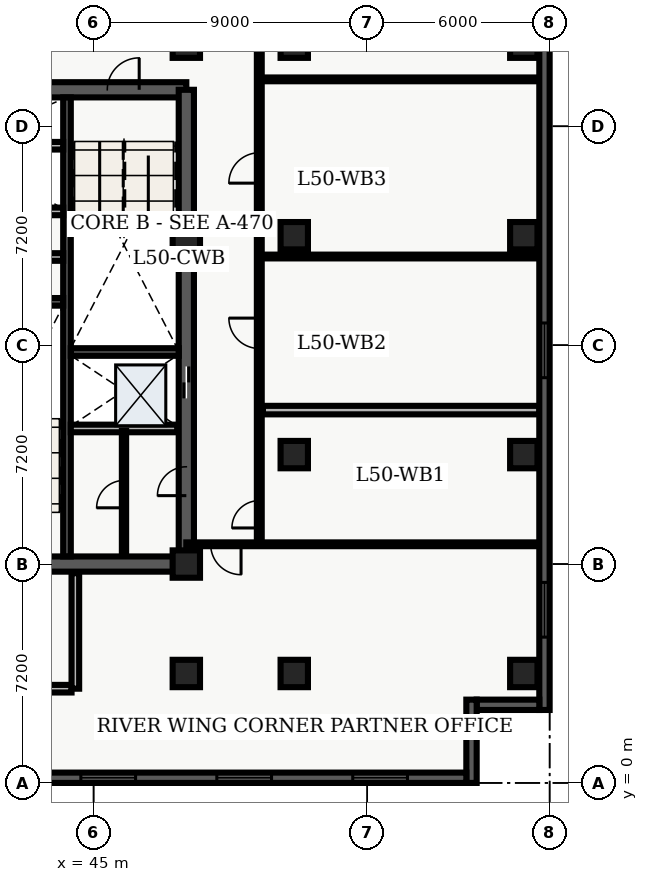
"""IFC4 building model, lengths in metres.
Left out: names, types, materials, properties, quantities, classifications, styles, units other than length and angle.
Written with IfcOpenShell. Run it as: python <this file> out.ifc"""

import sys

from ifc_helpers import new_model, entity, si_unit, converted_unit, direction, frame, origin_with_axes, origin_2d_with_axis, place, context, subcontext, project, spatial, polyline, rectangle, outline, extrude, element, fill, save


model = new_model("IFC4")
c1 = context("Model", 3, precision=1e-05, world=origin_with_axes(), true_north=direction((0.0, 1.0)))
c2 = subcontext(c1, "Body", "Model", "MODEL_VIEW")
j1 = project(units=[si_unit("LENGTHUNIT", "METRE"), converted_unit("PLANEANGLEUNIT", "DEGREE", entity("IfcPlaneAngleMeasure", 0.017), si_unit("PLANEANGLEUNIT", "RADIAN"), dimensions=[0, 0, 0, 0, 0, 0, 0])], contexts=[c1])
p1 = place(None, origin_with_axes())
s1 = spatial("IfcSite", under=j1, at=p1, CompositionType="ELEMENT")
p2 = place(p1, origin_with_axes())
s2 = spatial("IfcBuilding", under=s1, at=p2, CompositionType="ELEMENT")
p3 = place(p2, frame((0.0, 0.0, 204.3), z_axis=(0.0, 0.0, 1.0), x_axis=(1.0, 0.0, 0.0)))
s3 = spatial("IfcBuildingStorey", under=s2, at=p3, CompositionType="ELEMENT", Elevation=204.3)
p4 = place(p3, frame((40.2, 7.2, 0.0), z_axis=(0.0, 0.0, 1.0), x_axis=(1.0, 0.0, 0.0)))
e1 = element("IfcWall", 1, at=p4, inside=s3, PredefinedType="SHEAR", context=c2, shape_type="SweptSolid", body=[
    extrude(outline(polyline([(0.0, -0.25), (7.85, -0.25), (7.85, 0.25), (0.0, 0.25), (0.0, -0.25)])), origin_with_axes(), (0.0, 0.0, 1.0), 3.66),
])
p5 = place(p4, frame((2.175, 0.0, 0.0), z_axis=(0.0, 0.0, 1.0), x_axis=(1.0, 0.0, 0.0)))
e2 = element("IfcOpeningElement", 2, at=p5, cuts=e1, PredefinedType="OPENING", context=c2, shape_type="SweptSolid", body=[
    extrude(rectangle(XDim=1.05, YDim=0.52, at=origin_2d_with_axis()), origin_with_axes(), (0.0, 0.0, 1.0), 2.15),
])
p6 = place(p3, frame((40.2, 22.8, 0.0), z_axis=(0.0, 0.0, 1.0), x_axis=(1.0, 0.0, 0.0)))
e3 = element("IfcWall", 3, at=p6, inside=s3, PredefinedType="SHEAR", context=c2, shape_type="SweptSolid", body=[
    extrude(outline(polyline([(0.0, -0.25), (7.85, -0.25), (7.85, 0.25), (0.0, 0.25), (0.0, -0.25)])), origin_with_axes(), (0.0, 0.0, 1.0), 3.66),
])
p7 = place(p6, frame((5.775, 0.0, 0.0), z_axis=(0.0, 0.0, 1.0), x_axis=(1.0, 0.0, 0.0)))
e4 = element("IfcOpeningElement", 4, at=p7, cuts=e3, PredefinedType="OPENING", context=c2, shape_type="SweptSolid", body=[
    extrude(rectangle(XDim=1.05, YDim=0.52, at=origin_2d_with_axis()), origin_with_axes(), (0.0, 0.0, 1.0), 2.15),
])
p8 = place(p3, frame((48.05, 7.2, 0.0), z_axis=(0.0, 0.0, 1.0), x_axis=(0.0, 1.0, 0.0)))
e5 = element("IfcWall", 5, at=p8, inside=s3, PredefinedType="SHEAR", context=c2, shape_type="SweptSolid", body=[
    extrude(outline(polyline([(0.0, -0.25), (15.6, -0.25), (15.6, 0.25), (0.0, 0.25), (0.0, -0.25)])), origin_with_axes(), (0.0, 0.0, 1.0), 3.66),
])
p9 = place(p8, frame((5.975, 0.0, 0.0), z_axis=(0.0, 0.0, 1.0), x_axis=(1.0, 0.0, 0.0)))
e6 = element("IfcOpeningElement", 6, at=p9, cuts=e5, PredefinedType="OPENING", context=c2, shape_type="SweptSolid", body=[
    extrude(rectangle(XDim=1.05, YDim=0.52, at=origin_2d_with_axis()), origin_with_axes(), (0.0, 0.0, 1.0), 2.15),
])
p10 = place(p8, frame((2.725, 0.0, 0.0), z_axis=(0.0, 0.0, 1.0), x_axis=(1.0, 0.0, 0.0)))
e7 = element("IfcOpeningElement", 7, at=p10, cuts=e5, PredefinedType="OPENING", context=c2, shape_type="SweptSolid", body=[
    extrude(rectangle(XDim=0.95, YDim=0.52, at=origin_2d_with_axis()), origin_with_axes(), (0.0, 0.0, 1.0), 2.15),
])
p11 = place(p3, frame((44.125, 7.45, 0.0), z_axis=(0.0, 0.0, 1.0), x_axis=(0.0, 1.0, 0.0)))
e8 = element("IfcWall", 8, at=p11, inside=s3, PredefinedType="SHEAR", context=c2, shape_type="SweptSolid", body=[
    extrude(outline(polyline([(0.0, -0.125), (15.1, -0.125), (15.1, 0.125), (0.0, 0.125), (0.0, -0.125)])), origin_with_axes(), (0.0, 0.0, 1.0), 3.66),
])
for number, where, z_axis, x_axis in (
    (9, (40.45, 15.825, 0.0), (0.0, 0.0, 1.0), (1.0, 0.0, 0.0)),
    (10, (44.25, 14.175, 0.0), (0.0, 0.0, 1.0), (1.0, 0.0, 0.0)),
):
    element("IfcWall", number, at=place(p3, frame(where, z_axis=z_axis, x_axis=x_axis)), inside=s3, PredefinedType="SHEAR", context=c2, shape_type="SweptSolid", body=[
        extrude(outline(polyline([(0.0, -0.125), (3.55, -0.125), (3.55, 0.125), (0.0, 0.125), (0.0, -0.125)])), origin_with_axes(), (0.0, 0.0, 1.0), 3.66),
    ])
p12 = place(p3, frame((40.5, 17.3, 0.0), z_axis=(0.0, 0.0, 1.0), x_axis=(1.0, 0.0, 0.0)))
e11 = element("IfcWall", 11, at=p12, inside=s3, PredefinedType="SOLIDWALL", context=c2, shape_type="SweptSolid", body=[
    extrude(outline(polyline([(0.0, -0.125), (3.5, -0.125), (3.5, 0.125), (0.0, 0.125), (0.0, -0.125)])), origin_with_axes(), (0.0, 0.0, 1.0), 2.7),
])
p13 = place(p12, frame((2.4, 0.0, 0.0), z_axis=(0.0, 0.0, 1.0), x_axis=(1.0, 0.0, 0.0)))
e12 = element("IfcOpeningElement", 12, at=p13, cuts=e11, PredefinedType="OPENING", context=c2, shape_type="SweptSolid", body=[
    extrude(rectangle(XDim=0.9, YDim=0.27, at=origin_2d_with_axis()), origin_with_axes(), (0.0, 0.0, 1.0), 2.15),
])
p14 = place(p3, frame((40.5, 18.8, 0.0), z_axis=(0.0, 0.0, 1.0), x_axis=(1.0, 0.0, 0.0)))
e13 = element("IfcWall", 13, at=p14, inside=s3, PredefinedType="SOLIDWALL", context=c2, shape_type="SweptSolid", body=[
    extrude(outline(polyline([(0.0, -0.125), (3.5, -0.125), (3.5, 0.125), (0.0, 0.125), (0.0, -0.125)])), origin_with_axes(), (0.0, 0.0, 1.0), 2.7),
])
p15 = place(p3, frame((40.325, 3.1, 0.0), z_axis=(0.0, 0.0, 1.0), x_axis=(1.0, 0.0, 0.0)))
e14 = element("IfcWall", 14, at=p15, inside=s3, PredefinedType="SOLIDWALL", context=c2, shape_type="SweptSolid", body=[
    extrude(outline(polyline([(0.0, -0.125), (3.95, -0.125), (3.95, 0.125), (0.0, 0.125), (0.0, -0.125)])), origin_with_axes(), (0.0, 0.0, 1.0), 2.7),
])
p16 = place(p3, frame((44.4, 3.1, 0.0), z_axis=(0.0, 0.0, 1.0), x_axis=(0.0, 1.0, 0.0)))
e15 = element("IfcWall", 15, at=p16, inside=s3, PredefinedType="SOLIDWALL", context=c2, shape_type="SweptSolid", body=[
    extrude(outline(polyline([(0.0, -0.125), (3.8, -0.125), (3.8, 0.125), (0.0, 0.125), (0.0, -0.125)])), origin_with_axes(), (0.0, 0.0, 1.0), 2.7),
])
for number, where, z_axis, x_axis in (
    (16, (48.05, 3.6, 0.0), (0.0, 0.0, 1.0), (1.0, 0.0, 0.0)),
    (17, (48.05, 7.2, 0.0), (0.0, 0.0, 1.0), (1.0, 0.0, 0.0)),
    (18, (48.05, 18.0, 0.0), (0.0, 0.0, 1.0), (1.0, 0.0, 0.0)),
    (19, (48.05, 24.3, 0.0), (0.0, 0.0, 1.0), (1.0, 0.0, 0.0)),
    (20, (51.6, 3.6, 0.0), (0.0, 0.0, 1.0), (1.0, 0.0, 0.0)),
    (21, (51.6, 10.8, 0.0), (0.0, 0.0, 1.0), (1.0, 0.0, 0.0)),
    (22, (51.6, 18.0, 0.0), (0.0, 0.0, 1.0), (1.0, 0.0, 0.0)),
    (23, (51.6, 24.3, 0.0), (0.0, 0.0, 1.0), (1.0, 0.0, 0.0)),
    (24, (59.15, 3.6, 0.0), (0.0, 0.0, 1.0), (1.0, 0.0, 0.0)),
    (25, (59.15, 10.8, 0.0), (0.0, 0.0, 1.0), (1.0, 0.0, 0.0)),
    (26, (59.15, 18.0, 0.0), (0.0, 0.0, 1.0), (1.0, 0.0, 0.0)),
    (27, (59.15, 24.3, 0.0), (0.0, 0.0, 1.0), (1.0, 0.0, 0.0)),
):
    element("IfcColumn", number, at=place(p3, frame(where, z_axis=z_axis, x_axis=x_axis)), inside=s3, PredefinedType="COLUMN", context=c2, shape_type="SweptSolid", body=[
        extrude(rectangle(XDim=0.9, YDim=0.9, at=origin_2d_with_axis()), origin_with_axes(), (0.0, 0.0, 1.0), 3.9),
    ])
for number, where, z_axis, x_axis in (
    (28, (40.5, 20.96, 0.0), (0.0, 0.0, 1.0), (1.0, 0.0, 0.0)),
    (29, (44.25, 11.66, 0.0), (0.0, 0.0, 1.0), (1.0, 0.0, 0.0)),
):
    element("IfcWall", number, at=place(p3, frame(where, z_axis=z_axis, x_axis=x_axis)), inside=s3, PredefinedType="SOLIDWALL", context=c2, shape_type="SweptSolid", body=[
        extrude(outline(polyline([(0.0, -0.125), (3.5, -0.125), (3.5, 0.125), (0.0, 0.125), (0.0, -0.125)])), origin_with_axes(), (0.0, 0.0, 1.0), 2.7),
    ])
p17 = place(p3, frame((46.0, 7.5, 0.0), z_axis=(0.0, 0.0, 1.0), x_axis=(0.0, 1.0, 0.0)))
e30 = element("IfcWall", 30, at=p17, inside=s3, PredefinedType="PARTITIONING", context=c2, shape_type="SweptSolid", body=[
    extrude(outline(polyline([(0.0, -0.07), (4.08, -0.07), (4.08, 0.07), (0.0, 0.07), (0.0, -0.07)])), origin_with_axes(), (0.0, 0.0, 1.0), 2.7),
])
p18 = place(p17, frame((2.0, 0.0, 0.0), z_axis=(0.0, 0.0, 1.0), x_axis=(1.0, 0.0, 0.0)))
e31 = element("IfcOpeningElement", 31, at=p18, cuts=e30, PredefinedType="OPENING", context=c2, shape_type="SweptSolid", body=[
    extrude(rectangle(XDim=0.9, YDim=0.16, at=origin_2d_with_axis()), origin_with_axes(), (0.0, 0.0, 1.0), 2.15),
])
p19 = place(p3, frame((50.45, 7.85, 0.0), z_axis=(0.0, 0.0, 1.0), x_axis=(0.0, 1.0, 0.0)))
e32 = element("IfcWall", 32, at=p19, inside=s3, PredefinedType="PARTITIONING", context=c2, shape_type="SweptSolid", body=[
    extrude(outline(polyline([(0.0, -0.08), (18.8, -0.08), (18.8, 0.08), (0.0, 0.08), (0.0, -0.08)])), origin_with_axes(), (0.0, 0.0, 1.0), 2.7),
])
p20 = place(p19, frame((0.987, 0.0, 0.0), z_axis=(0.0, 0.0, 1.0), x_axis=(1.0, 0.0, 0.0)))
e33 = element("IfcOpeningElement", 33, at=p20, cuts=e32, PredefinedType="OPENING", context=c2, shape_type="SweptSolid", body=[
    extrude(rectangle(XDim=0.9, YDim=0.18, at=origin_2d_with_axis()), origin_with_axes(), (0.0, 0.0, 1.0), 2.15),
])
p21 = place(p19, frame((6.94, 0.0, 0.0), z_axis=(0.0, 0.0, 1.0), x_axis=(1.0, 0.0, 0.0)))
e34 = element("IfcOpeningElement", 34, at=p21, cuts=e32, PredefinedType="OPENING", context=c2, shape_type="SweptSolid", body=[
    extrude(rectangle(XDim=1.0, YDim=0.18, at=origin_2d_with_axis()), origin_with_axes(), (0.0, 0.0, 1.0), 2.15),
])
p22 = place(p19, frame((12.38, 0.0, 0.0), z_axis=(0.0, 0.0, 1.0), x_axis=(1.0, 0.0, 0.0)))
e35 = element("IfcOpeningElement", 35, at=p22, cuts=e32, PredefinedType="OPENING", context=c2, shape_type="SweptSolid", body=[
    extrude(rectangle(XDim=1.0, YDim=0.18, at=origin_2d_with_axis()), origin_with_axes(), (0.0, 0.0, 1.0), 2.15),
])
p23 = place(p19, frame((17.576, 0.0, 0.0), z_axis=(0.0, 0.0, 1.0), x_axis=(1.0, 0.0, 0.0)))
e36 = element("IfcOpeningElement", 36, at=p23, cuts=e32, PredefinedType="OPENING", context=c2, shape_type="SweptSolid", body=[
    extrude(rectangle(XDim=1.0, YDim=0.18, at=origin_2d_with_axis()), origin_with_axes(), (0.0, 0.0, 1.0), 2.15),
])
p24 = place(p3, frame((59.665, 7.85, 0.0), z_axis=(0.0, 0.0, 1.0), x_axis=(-1.0, 0.0, 0.0)))
e37 = element("IfcWall", 37, at=p24, inside=s3, PredefinedType="PARTITIONING", context=c2, shape_type="SweptSolid", body=[
    extrude(outline(polyline([(0.0, -0.062), (11.615, -0.062), (11.615, 0.062), (0.0, 0.062), (0.0, -0.062)])), origin_with_axes(), (0.0, 0.0, 1.0), 2.7),
])
p25 = place(p24, frame((10.315, 0.0, 0.0), z_axis=(0.0, 0.0, 1.0), x_axis=(1.0, 0.0, 0.0)))
e38 = element("IfcOpeningElement", 38, at=p25, cuts=e37, PredefinedType="OPENING", context=c2, shape_type="SweptSolid", body=[
    extrude(rectangle(XDim=1.0, YDim=0.145, at=origin_2d_with_axis()), origin_with_axes(), (0.0, 0.0, 1.0), 2.15),
])
p26 = place(p3, frame((50.57, 12.264, 0.0), z_axis=(0.0, 0.0, 1.0), x_axis=(1.0, 0.0, 0.0)))
e39 = element("IfcWall", 39, at=p26, inside=s3, PredefinedType="PARTITIONING", context=c2, shape_type="SweptSolid", body=[
    extrude(outline(polyline([(0.0, -0.14), (9.095, -0.14), (9.095, 0.14), (0.0, 0.14), (0.0, -0.14)])), origin_with_axes(), (0.0, 0.0, 1.0), 2.7),
])
for number, where, z_axis, x_axis in (
    (40, (50.57, 17.316, 0.0), (0.0, 0.0, 1.0), (1.0, 0.0, 0.0)),
    (41, (50.57, 23.143, 0.0), (0.0, 0.0, 1.0), (1.0, 0.0, 0.0)),
):
    element("IfcWall", number, at=place(p3, frame(where, z_axis=z_axis, x_axis=x_axis)), inside=s3, PredefinedType="PARTITIONING", context=c2, shape_type="SweptSolid", body=[
        extrude(outline(polyline([(0.0, -0.062), (9.095, -0.062), (9.095, 0.062), (0.0, 0.062), (0.0, -0.062)])), origin_with_axes(), (0.0, 0.0, 1.0), 2.7),
    ])
p27 = place(p3, frame((59.83, 26.06, 0.0), z_axis=(0.0, 0.0, 1.0), x_axis=(0.0, -1.0, 0.0)))
e42 = element("IfcWall", 42, at=p27, inside=s3, PredefinedType="SOLIDWALL", context=c2, shape_type="SweptSolid", body=[
    extrude(outline(polyline([(0.0, -0.17), (23.66, -0.17), (23.66, 0.17), (0.0, 0.17), (0.0, -0.17)])), origin_with_axes(), (0.0, 0.0, 1.0), 3.66),
])
p28 = place(p27, frame((11.83, 0.0, 0.45), z_axis=(0.0, 0.0, 1.0), x_axis=(1.0, 0.0, 0.0)))
e43 = element("IfcOpeningElement", 43, at=p28, cuts=e42, PredefinedType="OPENING", context=c2, shape_type="SweptSolid", body=[
    extrude(rectangle(XDim=1.8, YDim=0.36, at=origin_2d_with_axis()), origin_with_axes(), (0.0, 0.0, 1.0), 2.1),
])
p29 = place(p27, frame((20.364, 0.0, 0.45), z_axis=(0.0, 0.0, 1.0), x_axis=(1.0, 0.0, 0.0)))
e44 = element("IfcOpeningElement", 44, at=p29, cuts=e42, PredefinedType="OPENING", context=c2, shape_type="SweptSolid", body=[
    extrude(rectangle(XDim=1.8, YDim=0.36, at=origin_2d_with_axis()), origin_with_axes(), (0.0, 0.0, 1.0), 2.1),
])
p30 = place(p3, frame((59.66, 2.57, 0.0), z_axis=(0.0, 0.0, 1.0), x_axis=(-1.0, 0.0, 0.0)))
e45 = element("IfcWall", 45, at=p30, inside=s3, PredefinedType="SOLIDWALL", context=c2, shape_type="SweptSolid", body=[
    extrude(outline(polyline([(0.0, -0.17), (2.06, -0.17), (2.06, 0.17), (0.0, 0.17), (0.0, -0.17)])), origin_with_axes(), (0.0, 0.0, 1.0), 3.66),
])
p31 = place(p3, frame((57.43, 2.74, 0.0), z_axis=(0.0, 0.0, 1.0), x_axis=(0.0, -1.0, 0.0)))
e46 = element("IfcWall", 46, at=p31, inside=s3, PredefinedType="SOLIDWALL", context=c2, shape_type="SweptSolid", body=[
    extrude(outline(polyline([(0.0, -0.17), (2.74, -0.17), (2.74, 0.17), (0.0, 0.17), (0.0, -0.17)])), origin_with_axes(), (0.0, 0.0, 1.0), 3.66),
])
p32 = place(p3, frame((57.26, 0.17, 0.0), z_axis=(0.0, 0.0, 1.0), x_axis=(-1.0, 0.0, 0.0)))
e47 = element("IfcWall", 47, at=p32, inside=s3, PredefinedType="SOLIDWALL", context=c2, shape_type="SweptSolid", body=[
    extrude(outline(polyline([(0.0, -0.17), (54.86, -0.17), (54.86, 0.17), (0.0, 0.17), (0.0, -0.17)])), origin_with_axes(), (0.0, 0.0, 1.0), 3.66),
])
p33 = place(p32, frame((2.836, 0.0, 0.45), z_axis=(0.0, 0.0, 1.0), x_axis=(1.0, 0.0, 0.0)))
e48 = element("IfcOpeningElement", 48, at=p33, cuts=e47, PredefinedType="OPENING", context=c2, shape_type="SweptSolid", body=[
    extrude(rectangle(XDim=1.8, YDim=0.36, at=origin_2d_with_axis()), origin_with_axes(), (0.0, 0.0, 1.0), 2.1),
])
p34 = place(p32, frame((7.307, 0.0, 0.45), z_axis=(0.0, 0.0, 1.0), x_axis=(1.0, 0.0, 0.0)))
e49 = element("IfcOpeningElement", 49, at=p34, cuts=e47, PredefinedType="OPENING", context=c2, shape_type="SweptSolid", body=[
    extrude(rectangle(XDim=1.8, YDim=0.36, at=origin_2d_with_axis()), origin_with_axes(), (0.0, 0.0, 1.0), 2.1),
])
p35 = place(p32, frame((11.779, 0.0, 0.45), z_axis=(0.0, 0.0, 1.0), x_axis=(1.0, 0.0, 0.0)))
e50 = element("IfcOpeningElement", 50, at=p35, cuts=e47, PredefinedType="OPENING", context=c2, shape_type="SweptSolid", body=[
    extrude(rectangle(XDim=1.8, YDim=0.36, at=origin_2d_with_axis()), origin_with_axes(), (0.0, 0.0, 1.0), 2.1),
])
p36 = place(p32, frame((16.251, 0.0, 0.45), z_axis=(0.0, 0.0, 1.0), x_axis=(1.0, 0.0, 0.0)))
e51 = element("IfcOpeningElement", 51, at=p36, cuts=e47, PredefinedType="OPENING", context=c2, shape_type="SweptSolid", body=[
    extrude(rectangle(XDim=1.8, YDim=0.36, at=origin_2d_with_axis()), origin_with_axes(), (0.0, 0.0, 1.0), 2.1),
])
p37 = place(p32, frame((20.723, 0.0, 0.45), z_axis=(0.0, 0.0, 1.0), x_axis=(1.0, 0.0, 0.0)))
e52 = element("IfcOpeningElement", 52, at=p37, cuts=e47, PredefinedType="OPENING", context=c2, shape_type="SweptSolid", body=[
    extrude(rectangle(XDim=1.8, YDim=0.36, at=origin_2d_with_axis()), origin_with_axes(), (0.0, 0.0, 1.0), 2.1),
])
p38 = place(p32, frame((25.194, 0.0, 0.45), z_axis=(0.0, 0.0, 1.0), x_axis=(1.0, 0.0, 0.0)))
e53 = element("IfcOpeningElement", 53, at=p38, cuts=e47, PredefinedType="OPENING", context=c2, shape_type="SweptSolid", body=[
    extrude(rectangle(XDim=1.8, YDim=0.36, at=origin_2d_with_axis()), origin_with_axes(), (0.0, 0.0, 1.0), 2.1),
])
p39 = place(p32, frame((29.666, 0.0, 0.45), z_axis=(0.0, 0.0, 1.0), x_axis=(1.0, 0.0, 0.0)))
e54 = element("IfcOpeningElement", 54, at=p39, cuts=e47, PredefinedType="OPENING", context=c2, shape_type="SweptSolid", body=[
    extrude(rectangle(XDim=1.8, YDim=0.36, at=origin_2d_with_axis()), origin_with_axes(), (0.0, 0.0, 1.0), 2.1),
])
p40 = place(p32, frame((34.138, 0.0, 0.45), z_axis=(0.0, 0.0, 1.0), x_axis=(1.0, 0.0, 0.0)))
e55 = element("IfcOpeningElement", 55, at=p40, cuts=e47, PredefinedType="OPENING", context=c2, shape_type="SweptSolid", body=[
    extrude(rectangle(XDim=1.8, YDim=0.36, at=origin_2d_with_axis()), origin_with_axes(), (0.0, 0.0, 1.0), 2.1),
])
p41 = place(p32, frame((38.609, 0.0, 0.45), z_axis=(0.0, 0.0, 1.0), x_axis=(1.0, 0.0, 0.0)))
e56 = element("IfcOpeningElement", 56, at=p41, cuts=e47, PredefinedType="OPENING", context=c2, shape_type="SweptSolid", body=[
    extrude(rectangle(XDim=1.8, YDim=0.36, at=origin_2d_with_axis()), origin_with_axes(), (0.0, 0.0, 1.0), 2.1),
])
p42 = place(p32, frame((43.081, 0.0, 0.45), z_axis=(0.0, 0.0, 1.0), x_axis=(1.0, 0.0, 0.0)))
e57 = element("IfcOpeningElement", 57, at=p42, cuts=e47, PredefinedType="OPENING", context=c2, shape_type="SweptSolid", body=[
    extrude(rectangle(XDim=1.8, YDim=0.36, at=origin_2d_with_axis()), origin_with_axes(), (0.0, 0.0, 1.0), 2.1),
])
p43 = place(p32, frame((47.553, 0.0, 0.45), z_axis=(0.0, 0.0, 1.0), x_axis=(1.0, 0.0, 0.0)))
e58 = element("IfcOpeningElement", 58, at=p43, cuts=e47, PredefinedType="OPENING", context=c2, shape_type="SweptSolid", body=[
    extrude(rectangle(XDim=1.8, YDim=0.36, at=origin_2d_with_axis()), origin_with_axes(), (0.0, 0.0, 1.0), 2.1),
])
p44 = place(p32, frame((52.024, 0.0, 0.45), z_axis=(0.0, 0.0, 1.0), x_axis=(1.0, 0.0, 0.0)))
e59 = element("IfcOpeningElement", 59, at=p44, cuts=e47, PredefinedType="OPENING", context=c2, shape_type="SweptSolid", body=[
    extrude(rectangle(XDim=1.8, YDim=0.36, at=origin_2d_with_axis()), origin_with_axes(), (0.0, 0.0, 1.0), 2.1),
])
p45 = place(p8, frame((5.975, 0.0, 0.0), z_axis=(0.0, 0.0, 1.0), x_axis=(1.0, 0.0, 0.0)))
e60 = element("IfcDoor", 60, at=p45, inside=s3, OperationType="SLIDING_TO_LEFT", PredefinedType="DOOR", context=c2, shape_type="SweptSolid", body=[
    extrude(rectangle(XDim=1.05, YDim=0.09, at=origin_2d_with_axis()), origin_with_axes(), (0.0, 0.0, 1.0), 2.15),
])
fill(e6, e60)
p46 = place(p6, frame((5.775, 0.0, 0.0), z_axis=(0.0, 0.0, 1.0), x_axis=(1.0, 0.0, 0.0)))
e61 = element("IfcDoor", 61, at=p46, inside=s3, OperationType="SINGLE_SWING_RIGHT", PredefinedType="DOOR", context=c2, shape_type="SweptSolid", body=[
    extrude(rectangle(XDim=1.05, YDim=0.09, at=origin_2d_with_axis()), origin_with_axes(), (0.0, 0.0, 1.0), 2.15),
])
fill(e4, e61)
p47 = place(p17, frame((2.0, 0.0, 0.0), z_axis=(0.0, 0.0, 1.0), x_axis=(1.0, 0.0, 0.0)))
e62 = element("IfcDoor", 62, at=p47, inside=s3, OperationType="SINGLE_SWING_LEFT", PredefinedType="DOOR", context=c2, shape_type="SweptSolid", body=[
    extrude(rectangle(XDim=0.9, YDim=0.084, at=origin_2d_with_axis()), origin_with_axes(), (0.0, 0.0, 1.0), 2.15),
])
fill(e31, e62)
p48 = place(p8, frame((2.725, 0.0, 0.0), z_axis=(0.0, 0.0, 1.0), x_axis=(1.0, 0.0, 0.0)))
e63 = element("IfcDoor", 63, at=p48, inside=s3, OperationType="SINGLE_SWING_LEFT", PredefinedType="DOOR", context=c2, shape_type="SweptSolid", body=[
    extrude(rectangle(XDim=0.95, YDim=0.09, at=origin_2d_with_axis()), origin_with_axes(), (0.0, 0.0, 1.0), 2.15),
])
fill(e7, e63)
p49 = place(p24, frame((10.315, 0.0, 0.0), z_axis=(0.0, 0.0, 1.0), x_axis=(1.0, 0.0, 0.0)))
e64 = element("IfcDoor", 64, at=p49, inside=s3, OperationType="SINGLE_SWING_LEFT", PredefinedType="DOOR", context=c2, shape_type="SweptSolid", body=[
    extrude(rectangle(XDim=1.0, YDim=0.075, at=origin_2d_with_axis()), origin_with_axes(), (0.0, 0.0, 1.0), 2.15),
])
fill(e38, e64)
p50 = place(p19, frame((0.987, 0.0, 0.0), z_axis=(0.0, 0.0, 1.0), x_axis=(1.0, 0.0, 0.0)))
e65 = element("IfcDoor", 65, at=p50, inside=s3, OperationType="SINGLE_SWING_LEFT", PredefinedType="DOOR", context=c2, shape_type="SweptSolid", body=[
    extrude(rectangle(XDim=0.9, YDim=0.09, at=origin_2d_with_axis()), origin_with_axes(), (0.0, 0.0, 1.0), 2.15),
])
fill(e33, e65)
p51 = place(p19, frame((6.94, 0.0, 0.0), z_axis=(0.0, 0.0, 1.0), x_axis=(1.0, 0.0, 0.0)))
e66 = element("IfcDoor", 66, at=p51, inside=s3, OperationType="SINGLE_SWING_RIGHT", PredefinedType="DOOR", context=c2, shape_type="SweptSolid", body=[
    extrude(rectangle(XDim=1.0, YDim=0.09, at=origin_2d_with_axis()), origin_with_axes(), (0.0, 0.0, 1.0), 2.15),
])
fill(e34, e66)
p52 = place(p19, frame((12.38, 0.0, 0.0), z_axis=(0.0, 0.0, 1.0), x_axis=(1.0, 0.0, 0.0)))
e67 = element("IfcDoor", 67, at=p52, inside=s3, OperationType="SINGLE_SWING_LEFT", PredefinedType="DOOR", context=c2, shape_type="SweptSolid", body=[
    extrude(rectangle(XDim=1.0, YDim=0.09, at=origin_2d_with_axis()), origin_with_axes(), (0.0, 0.0, 1.0), 2.15),
])
fill(e35, e67)
p53 = place(p27, frame((11.83, 0.0, 0.45), z_axis=(0.0, 0.0, 1.0), x_axis=(1.0, 0.0, 0.0)))
e68 = element("IfcWindow", 68, at=p53, inside=s3, PredefinedType="WINDOW", context=c2, shape_type="SweptSolid", body=[
    extrude(rectangle(XDim=1.8, YDim=0.09, at=origin_2d_with_axis()), origin_with_axes(), (0.0, 0.0, 1.0), 2.1),
])
fill(e43, e68)
p54 = place(p27, frame((20.364, 0.0, 0.45), z_axis=(0.0, 0.0, 1.0), x_axis=(1.0, 0.0, 0.0)))
e69 = element("IfcWindow", 69, at=p54, inside=s3, PredefinedType="WINDOW", context=c2, shape_type="SweptSolid", body=[
    extrude(rectangle(XDim=1.8, YDim=0.09, at=origin_2d_with_axis()), origin_with_axes(), (0.0, 0.0, 1.0), 2.1),
])
fill(e44, e69)
p55 = place(p32, frame((2.836, 0.0, 0.45), z_axis=(0.0, 0.0, 1.0), x_axis=(1.0, 0.0, 0.0)))
e70 = element("IfcWindow", 70, at=p55, inside=s3, PredefinedType="WINDOW", context=c2, shape_type="SweptSolid", body=[
    extrude(rectangle(XDim=1.8, YDim=0.09, at=origin_2d_with_axis()), origin_with_axes(), (0.0, 0.0, 1.0), 2.1),
])
fill(e48, e70)
p56 = place(p32, frame((7.307, 0.0, 0.45), z_axis=(0.0, 0.0, 1.0), x_axis=(1.0, 0.0, 0.0)))
e71 = element("IfcWindow", 71, at=p56, inside=s3, PredefinedType="WINDOW", context=c2, shape_type="SweptSolid", body=[
    extrude(rectangle(XDim=1.8, YDim=0.09, at=origin_2d_with_axis()), origin_with_axes(), (0.0, 0.0, 1.0), 2.1),
])
fill(e49, e71)
p57 = place(p32, frame((11.779, 0.0, 0.45), z_axis=(0.0, 0.0, 1.0), x_axis=(1.0, 0.0, 0.0)))
e72 = element("IfcWindow", 72, at=p57, inside=s3, PredefinedType="WINDOW", context=c2, shape_type="SweptSolid", body=[
    extrude(rectangle(XDim=1.8, YDim=0.09, at=origin_2d_with_axis()), origin_with_axes(), (0.0, 0.0, 1.0), 2.1),
])
fill(e50, e72)
save(model, sys.argv[1])
